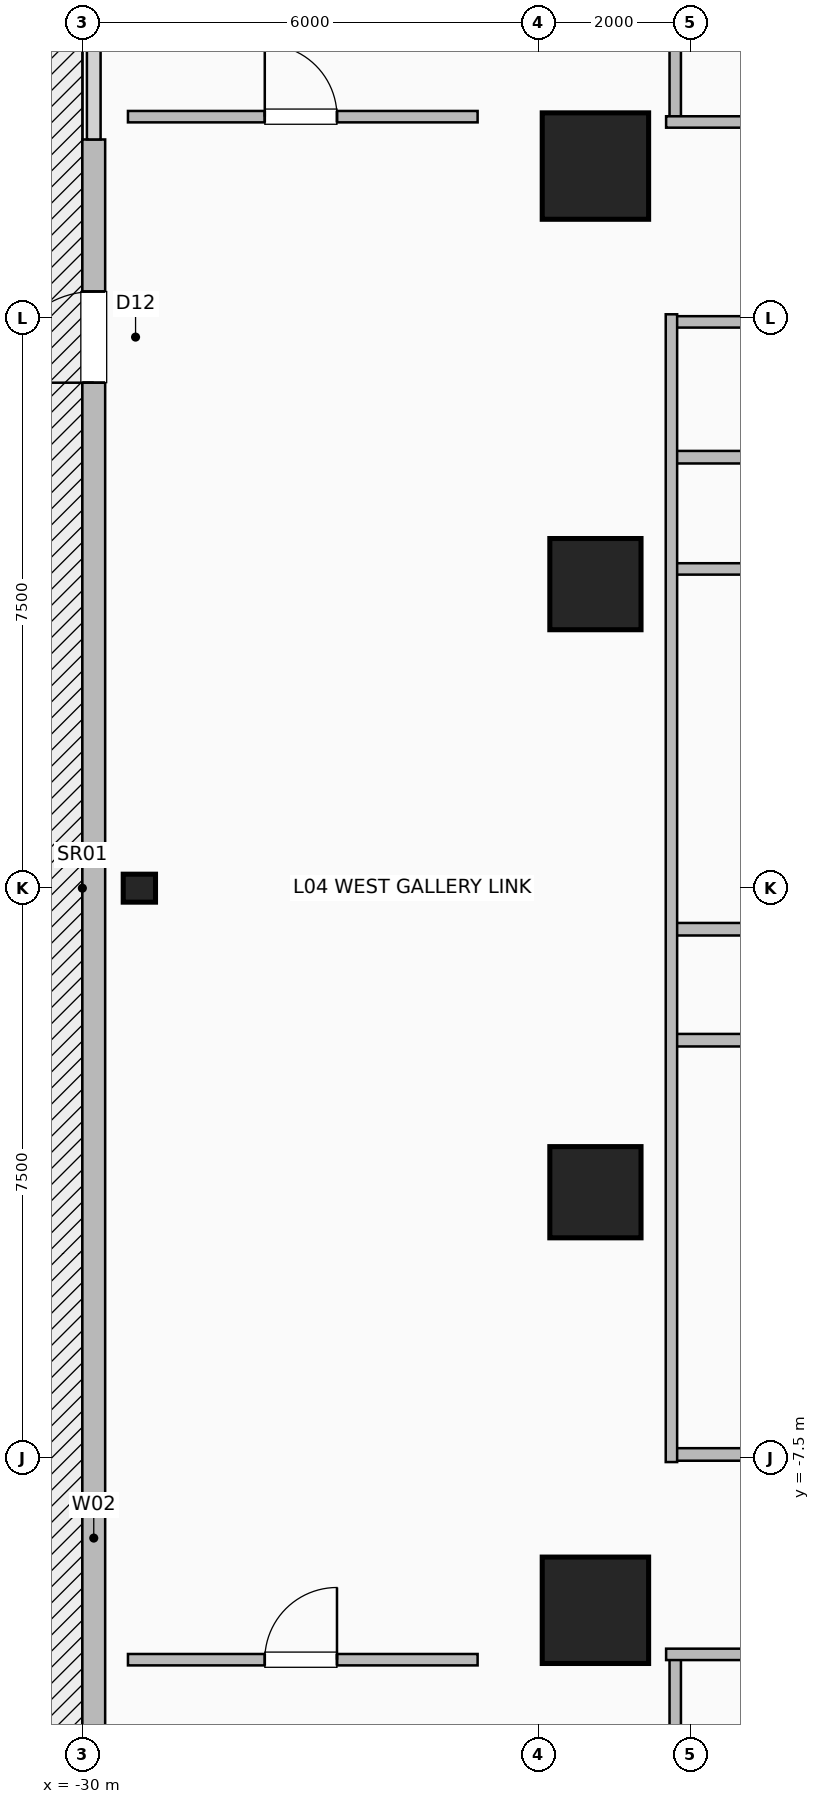
"""IFC4 building model, lengths in metres.
Left out: names, types, materials, properties, quantities, classifications, styles, units other than length and angle.
Written with IfcOpenShell. Run it as: python <this file> out.ifc"""

import sys

from ifc_helpers import new_model, si_unit, direction, frame, frame_2d, origin, origin_2d, place, context, subcontext, project, spatial, rectangle, hollow_rectangle, i_section, extrude, element, fill, save


model = new_model("IFC4")
c1 = context("Model", 3, precision=1e-05, world=origin(), true_north=direction((0.0, 1.0)))
c2 = subcontext(c1, "Body", "Model", "MODEL_VIEW")
j1 = project(units=[si_unit("LENGTHUNIT", "METRE"), si_unit("PLANEANGLEUNIT", "RADIAN")], contexts=[c1])
p1 = place(None, origin())
s1 = spatial("IfcSite", under=j1, at=p1, CompositionType="ELEMENT")
p2 = place(p1, origin())
s2 = spatial("IfcBuilding", under=s1, at=p2, CompositionType="ELEMENT")
p3 = place(p2, frame((0.0, 0.0, 21.6)))
s3 = spatial("IfcBuildingStorey", under=s2, at=p3, CompositionType="ELEMENT", Elevation=21.6)
for number, where, z_axis, x_axis in (
    (1, (-23.25, -9.5, 0.0), (0.0, 0.0, 1.0), (1.0, 0.0, 0.0)),
    (2, (-23.25, 9.5, 0.0), (0.0, 0.0, 1.0), (1.0, 0.0, 0.0)),
):
    element("IfcColumn", number, at=place(p3, frame(where, z_axis=z_axis, x_axis=x_axis)), inside=s3, PredefinedType="COLUMN", context=c2, shape_type="SweptSolid", body=[
        extrude(hollow_rectangle(XDim=1.4, YDim=1.4, WallThickness=0.06, at=origin_2d()), origin(), (0.0, 0.0, 1.0), 5.0),
    ])
for number, where, z_axis, x_axis in (
    (3, (-23.25, -4.0, -0.4), (0.0, 0.0, 1.0), (1.0, 0.0, 0.0)),
    (4, (-23.25, 4.0, -0.4), (0.0, 0.0, 1.0), (1.0, 0.0, 0.0)),
):
    element("IfcColumn", number, at=place(p3, frame(where, z_axis=z_axis, x_axis=x_axis)), inside=s3, PredefinedType="COLUMN", context=c2, shape_type="SweptSolid", body=[
        extrude(hollow_rectangle(XDim=1.2, YDim=1.2, WallThickness=0.055, at=origin_2d()), origin(), (0.0, 0.0, 1.0), 5.8),
    ])
p4 = place(p3, frame((-29.25, 0.0, 0.0), z_axis=(0.0, 0.0, 1.0), x_axis=(1.0, 0.0, 0.0)))
e5 = element("IfcColumn", 5, at=p4, inside=s3, PredefinedType="COLUMN", context=c2, shape_type="SweptSolid", body=[
    extrude(i_section(OverallWidth=0.368, OverallDepth=0.425, WebThickness=0.03, FlangeThickness=0.048, FilletRadius=0.02, at=origin_2d()), origin(), (0.0, 0.0, 1.0), 5.0),
])
p5 = place(p3, frame((-29.85, -23.75, 0.0), z_axis=(0.0, 0.0, 1.0), x_axis=(0.0, 1.0, 0.0)))
e6 = element("IfcWall", 6, at=p5, inside=s3, PredefinedType="SOLIDWALL", context=c2, shape_type="SweptSolid", body=[
    extrude(rectangle(XDim=33.6, YDim=0.3, at=frame_2d((16.8, 0.0))), origin(), (0.0, 0.0, 1.0), 5.0),
])
p6 = place(p5, frame((30.4, 0.0, 0.0)))
e7 = element("IfcOpeningElement", 7, at=p6, cuts=e6, PredefinedType="OPENING", context=c2, shape_type="SweptSolid", body=[
    extrude(rectangle(XDim=1.2, YDim=2.25, at=frame_2d((0.6, 1.125))), frame((0.0, 0.16, 0.0), z_axis=(0.0, -1.0, 0.0), x_axis=(1.0, 0.0, 0.0)), (0.0, 0.0, 1.0), 0.32),
])
p7 = place(p3, frame((-22.2, -22.2, 0.0), z_axis=(0.0, 0.0, 1.0), x_axis=(0.0, 1.0, 0.0)))
e8 = element("IfcWall", 8, at=p7, inside=s3, PredefinedType="PARTITIONING", context=c2, shape_type="SweptSolid", body=[
    extrude(rectangle(XDim=12.12, YDim=0.15, at=frame_2d((6.06, 0.0))), origin(), (0.0, 0.0, 1.0), 5.0),
])
p8 = place(p3, frame((-22.32, -10.08, 0.0), z_axis=(0.0, 0.0, 1.0), x_axis=(1.0, 0.0, 0.0)))
e9 = element("IfcWall", 9, at=p8, inside=s3, PredefinedType="PARTITIONING", context=c2, shape_type="SweptSolid", body=[
    extrude(rectangle(XDim=44.64, YDim=0.15, at=frame_2d((22.32, 0.0))), origin(), (0.0, 0.0, 1.0), 5.0),
])
p9 = place(p8, frame((8.07, 0.0, 0.0)))
e10 = element("IfcOpeningElement", 10, at=p9, cuts=e9, PredefinedType="OPENING", context=c2, shape_type="SweptSolid", body=[
    extrude(rectangle(XDim=1.8, YDim=2.08, at=frame_2d((0.9, 1.04))), frame((0.0, 0.085, 0.0), z_axis=(0.0, -1.0, 0.0), x_axis=(1.0, 0.0, 0.0)), (0.0, 0.0, 1.0), 0.17),
])
p10 = place(p8, frame((22.42, 0.0, 0.0)))
e11 = element("IfcOpeningElement", 11, at=p10, cuts=e9, PredefinedType="OPENING", context=c2, shape_type="SweptSolid", body=[
    extrude(rectangle(XDim=1.8, YDim=2.08, at=frame_2d((0.9, 1.04))), frame((0.0, 0.085, 0.0), z_axis=(0.0, -1.0, 0.0), x_axis=(1.0, 0.0, 0.0)), (0.0, 0.0, 1.0), 0.17),
])
p11 = place(p8, frame((35.77, 0.0, 0.0)))
e12 = element("IfcOpeningElement", 12, at=p11, cuts=e9, PredefinedType="OPENING", context=c2, shape_type="SweptSolid", body=[
    extrude(rectangle(XDim=1.8, YDim=2.08, at=frame_2d((0.9, 1.04))), frame((0.0, 0.085, 0.0), z_axis=(0.0, -1.0, 0.0), x_axis=(1.0, 0.0, 0.0)), (0.0, 0.0, 1.0), 0.17),
])
p12 = place(p3, frame((-22.2, 10.08, 0.0), z_axis=(0.0, 0.0, 1.0), x_axis=(0.0, 1.0, 0.0)))
e13 = element("IfcWall", 13, at=p12, inside=s3, PredefinedType="PARTITIONING", context=c2, shape_type="SweptSolid", body=[
    extrude(rectangle(XDim=12.12, YDim=0.15, at=frame_2d((6.06, 0.0))), origin(), (0.0, 0.0, 1.0), 5.0),
])
p13 = place(p3, frame((-22.32, 10.08, 0.0), z_axis=(0.0, 0.0, 1.0), x_axis=(1.0, 0.0, 0.0)))
e14 = element("IfcWall", 14, at=p13, inside=s3, PredefinedType="PARTITIONING", context=c2, shape_type="SweptSolid", body=[
    extrude(rectangle(XDim=44.64, YDim=0.15, at=frame_2d((22.32, 0.0))), origin(), (0.0, 0.0, 1.0), 5.0),
])
p14 = place(p13, frame((8.32, 0.0, 0.0)))
e15 = element("IfcOpeningElement", 15, at=p14, cuts=e14, PredefinedType="OPENING", context=c2, shape_type="SweptSolid", body=[
    extrude(rectangle(XDim=1.8, YDim=2.08, at=frame_2d((0.9, 1.04))), frame((0.0, 0.085, 0.0), z_axis=(0.0, -1.0, 0.0), x_axis=(1.0, 0.0, 0.0)), (0.0, 0.0, 1.0), 0.17),
])
p15 = place(p13, frame((23.345, 0.0, 0.0)))
e16 = element("IfcOpeningElement", 16, at=p15, cuts=e14, PredefinedType="OPENING", context=c2, shape_type="SweptSolid", body=[
    extrude(rectangle(XDim=0.95, YDim=2.06, at=frame_2d((0.475, 1.03))), frame((0.0, 0.085, 0.0), z_axis=(0.0, -1.0, 0.0), x_axis=(1.0, 0.0, 0.0)), (0.0, 0.0, 1.0), 0.17),
])
p16 = place(p13, frame((36.02, 0.0, 0.0)))
e17 = element("IfcOpeningElement", 17, at=p16, cuts=e14, PredefinedType="OPENING", context=c2, shape_type="SweptSolid", body=[
    extrude(rectangle(XDim=1.8, YDim=2.08, at=frame_2d((0.9, 1.04))), frame((0.0, 0.085, 0.0), z_axis=(0.0, -1.0, 0.0), x_axis=(1.0, 0.0, 0.0)), (0.0, 0.0, 1.0), 0.17),
])
for number, where, z_axis, x_axis in (
    (18, (-22.25, -0.54, 0.0), (0.0, 0.0, 1.0), (1.0, 0.0, 0.0)),
    (19, (-22.25, 5.67, 0.0), (0.0, 0.0, 1.0), (1.0, 0.0, 0.0)),
    (20, (-22.25, -7.45, 0.0), (0.0, 0.0, 1.0), (1.0, 0.0, 0.0)),
    (21, (-22.25, -2.0, 0.0), (0.0, 0.0, 1.0), (1.0, 0.0, 0.0)),
):
    element("IfcWall", number, at=place(p3, frame(where, z_axis=z_axis, x_axis=x_axis)), inside=s3, PredefinedType="PLUMBINGWALL", context=c2, shape_type="SweptSolid", body=[
        extrude(rectangle(XDim=12.17, YDim=0.165, at=frame_2d((6.085, 0.0))), origin(), (0.0, 0.0, 1.0), 5.0),
    ])
p17 = place(p3, frame((-22.25, 4.2, 0.0), z_axis=(0.0, 0.0, 1.0), x_axis=(1.0, 0.0, 0.0)))
e22 = element("IfcWall", 22, at=p17, inside=s3, PredefinedType="PARTITIONING", context=c2, shape_type="SweptSolid", body=[
    extrude(rectangle(XDim=12.17, YDim=0.15, at=frame_2d((6.085, 0.0))), origin(), (0.0, 0.0, 1.0), 3.375),
])
p18 = place(p3, frame((-22.25, 7.45, 0.0), z_axis=(0.0, 0.0, 1.0), x_axis=(1.0, 0.0, 0.0)))
e23 = element("IfcWall", 23, at=p18, inside=s3, PredefinedType="PARTITIONING", context=c2, shape_type="SweptSolid", body=[
    extrude(rectangle(XDim=12.17, YDim=0.15, at=frame_2d((6.085, 0.0))), origin(), (0.0, 0.0, 1.0), 5.0),
])
p19 = place(p3, frame((-29.4, -10.15, 0.0), z_axis=(0.0, 0.0, 1.0), x_axis=(1.0, 0.0, 0.0)))
e24 = element("IfcWall", 24, at=p19, inside=s3, PredefinedType="PARTITIONING", context=c2, shape_type="SweptSolid", body=[
    extrude(rectangle(XDim=4.6, YDim=0.15, at=frame_2d((2.3, 0.0))), origin(), (0.0, 0.0, 1.0), 5.0),
])
p20 = place(p19, frame((1.8, 0.0, 0.0)))
e25 = element("IfcOpeningElement", 25, at=p20, cuts=e24, PredefinedType="OPENING", context=c2, shape_type="SweptSolid", body=[
    extrude(rectangle(XDim=0.95, YDim=2.06, at=frame_2d((0.475, 1.03))), frame((0.0, 0.085, 0.0), z_axis=(0.0, -1.0, 0.0), x_axis=(1.0, 0.0, 0.0)), (0.0, 0.0, 1.0), 0.17),
])
p21 = place(p3, frame((-29.4, 10.15, 0.0), z_axis=(0.0, 0.0, 1.0), x_axis=(1.0, 0.0, 0.0)))
e26 = element("IfcWall", 26, at=p21, inside=s3, PredefinedType="PARTITIONING", context=c2, shape_type="SweptSolid", body=[
    extrude(rectangle(XDim=4.6, YDim=0.15, at=frame_2d((2.3, 0.0))), origin(), (0.0, 0.0, 1.0), 5.0),
])
p22 = place(p21, frame((1.8, 0.0, 0.0)))
e27 = element("IfcOpeningElement", 27, at=p22, cuts=e26, PredefinedType="OPENING", context=c2, shape_type="SweptSolid", body=[
    extrude(rectangle(XDim=0.95, YDim=2.06, at=frame_2d((0.475, 1.03))), frame((0.0, 0.085, 0.0), z_axis=(0.0, -1.0, 0.0), x_axis=(1.0, 0.0, 0.0)), (0.0, 0.0, 1.0), 0.17),
])
p23 = place(p3, frame((-22.25, -7.55, 0.0), z_axis=(0.0, 0.0, 1.0), x_axis=(0.0, 1.0, 0.0)))
e28 = element("IfcWall", 28, at=p23, inside=s3, PredefinedType="PARTITIONING", context=c2, shape_type="SweptSolid", body=[
    extrude(rectangle(XDim=15.1, YDim=0.15, at=frame_2d((7.55, 0.0))), origin(), (0.0, 0.0, 1.0), 5.0),
])
p24 = place(p6, origin())
e29 = element("IfcDoor", 29, at=p24, inside=s3, OperationType="SINGLE_SWING_LEFT", PredefinedType="DOOR", context=c2, shape_type="SweptSolid", body=[
    extrude(rectangle(XDim=1.2, YDim=2.25, at=frame_2d((0.6, 1.125))), frame((0.0, 0.025, 0.0), z_axis=(0.0, -1.0, 0.0), x_axis=(1.0, 0.0, 0.0)), (0.0, 0.0, 1.0), 0.05),
])
fill(e7, e29)
p25 = place(p20, origin())
e30 = element("IfcDoor", 30, at=p25, inside=s3, OperationType="SINGLE_SWING_RIGHT", PredefinedType="DOOR", context=c2, shape_type="SweptSolid", body=[
    extrude(rectangle(XDim=0.95, YDim=2.06, at=frame_2d((0.475, 1.03))), frame((0.0, 0.025, 0.0), z_axis=(0.0, -1.0, 0.0), x_axis=(1.0, 0.0, 0.0)), (0.0, 0.0, 1.0), 0.05),
])
fill(e25, e30)
p26 = place(p22, origin())
e31 = element("IfcDoor", 31, at=p26, inside=s3, OperationType="SINGLE_SWING_LEFT", PredefinedType="DOOR", context=c2, shape_type="SweptSolid", body=[
    extrude(rectangle(XDim=0.95, YDim=2.06, at=frame_2d((0.475, 1.03))), frame((0.0, 0.025, 0.0), z_axis=(0.0, -1.0, 0.0), x_axis=(1.0, 0.0, 0.0)), (0.0, 0.0, 1.0), 0.05),
])
fill(e27, e31)
save(model, sys.argv[1])
